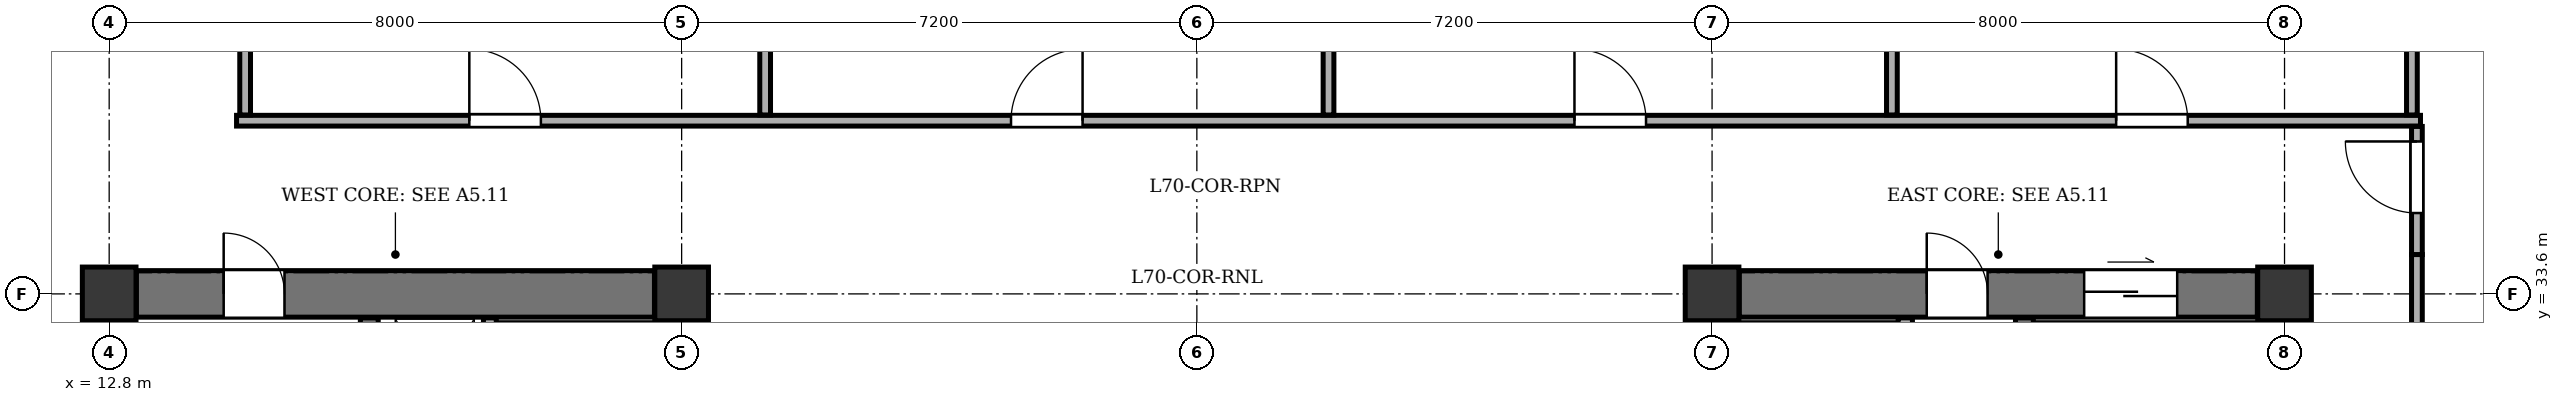
"""IFC4 building model, lengths in metres.
Left out: names, types, materials, properties, quantities, classifications, styles, units other than length and angle.
Written with IfcOpenShell. Run it as: python <this file> out.ifc"""

import sys

from ifc_helpers import new_model, si_unit, direction, frame, frame_2d, origin, origin_2d, place, context, subcontext, project, spatial, rectangle, extrude, element, fill, save


model = new_model("IFC4")
c1 = context("Model", 3, precision=1e-05, world=origin(), true_north=direction((0.0, 1.0)))
c2 = subcontext(c1, "Body", "Model", "MODEL_VIEW")
j1 = project(units=[si_unit("LENGTHUNIT", "METRE"), si_unit("PLANEANGLEUNIT", "RADIAN")], contexts=[c1])
p1 = place(None, origin())
s1 = spatial("IfcSite", under=j1, at=p1, CompositionType="ELEMENT")
p2 = place(p1, origin())
s2 = spatial("IfcBuilding", under=s1, at=p2, CompositionType="ELEMENT")
p3 = place(p2, frame((0.0, 0.0, 265.3)))
s3 = spatial("IfcBuildingStorey", under=s2, at=p3, CompositionType="ELEMENT", Elevation=265.3)
for number, where, z_axis, x_axis in (
    (1, (12.8, 33.6, 0.0), (0.0, 0.0, 1.0), (1.0, 0.0, 0.0)),
    (2, (20.8, 33.6, 0.0), (0.0, 0.0, 1.0), (1.0, 0.0, 0.0)),
    (3, (35.2, 33.6, 0.0), (0.0, 0.0, 1.0), (1.0, 0.0, 0.0)),
    (4, (43.2, 33.6, 0.0), (0.0, 0.0, 1.0), (1.0, 0.0, 0.0)),
):
    element("IfcColumn", number, at=place(p3, frame(where, z_axis=z_axis, x_axis=x_axis)), inside=s3, PredefinedType="COLUMN", context=c2, shape_type="SweptSolid", body=[
        extrude(rectangle(XDim=0.75, YDim=0.75, at=origin_2d()), origin(), (0.0, 0.0, 1.0), 3.4),
    ])
p4 = place(p3, frame((12.8, 21.18, 0.0), z_axis=(0.0, 0.0, 1.0), x_axis=(0.0, 1.0, 0.0)))
e5 = element("IfcWall", 5, at=p4, inside=s3, PredefinedType="SHEAR", context=c2, shape_type="SweptSolid", body=[
    extrude(rectangle(XDim=12.04, YDim=0.65, at=frame_2d((6.02, 0.0))), origin(), (0.0, 0.0, 1.0), 2.95),
])
p5 = place(p3, frame((13.18, 33.6, 0.0), z_axis=(0.0, 0.0, 1.0), x_axis=(1.0, 0.0, 0.0)))
e6 = element("IfcWall", 6, at=p5, inside=s3, PredefinedType="SHEAR", context=c2, shape_type="SweptSolid", body=[
    extrude(rectangle(XDim=7.24, YDim=0.65, at=frame_2d((3.62, 0.0))), origin(), (0.0, 0.0, 1.0), 2.95),
])
p6 = place(p5, frame((1.22, 0.0, 0.0)))
e7 = element("IfcOpeningElement", 7, at=p6, cuts=e6, PredefinedType="OPENING", context=c2, shape_type="SweptSolid", body=[
    extrude(rectangle(XDim=0.85, YDim=2.02, at=frame_2d((0.425, 1.01))), frame((0.0, 0.335, 0.0), z_axis=(0.0, -1.0, 0.0), x_axis=(1.0, 0.0, 0.0)), (0.0, 0.0, 1.0), 0.67),
])
p7 = place(p3, frame((20.8, 31.1, 0.0), z_axis=(0.0, 0.0, 1.0), x_axis=(0.0, 1.0, 0.0)))
e8 = element("IfcWall", 8, at=p7, inside=s3, PredefinedType="SHEAR", context=c2, shape_type="SweptSolid", body=[
    extrude(rectangle(XDim=2.12, YDim=0.65, at=frame_2d((1.06, 0.0))), origin(), (0.0, 0.0, 1.0), 2.95),
])
p8 = place(p7, frame((0.4, 0.0, 0.0)))
e9 = element("IfcOpeningElement", 9, at=p8, cuts=e8, PredefinedType="OPENING", context=c2, shape_type="SweptSolid", body=[
    extrude(rectangle(XDim=1.1, YDim=2.1, at=frame_2d((0.55, 1.05))), frame((0.0, 0.335, 0.0), z_axis=(0.0, -1.0, 0.0), x_axis=(1.0, 0.0, 0.0)), (0.0, 0.0, 1.0), 0.67),
])
p9 = place(p3, frame((16.435, 21.135, 0.0), z_axis=(0.0, 0.0, 1.0), x_axis=(0.0, 1.0, 0.0)))
e10 = element("IfcWall", 10, at=p9, inside=s3, PredefinedType="SHEAR", context=c2, shape_type="SweptSolid", body=[
    extrude(rectangle(XDim=12.13, YDim=0.25, at=frame_2d((6.065, 0.0))), origin(), (0.0, 0.0, 1.0), 2.95),
])
p10 = place(p9, frame((0.515, 0.0, 0.0)))
e11 = element("IfcOpeningElement", 11, at=p10, cuts=e10, PredefinedType="OPENING", context=c2, shape_type="SweptSolid", body=[
    extrude(rectangle(XDim=1.2, YDim=2.15, at=frame_2d((0.6, 1.075))), frame((0.0, 0.135, 0.0), z_axis=(0.0, -1.0, 0.0), x_axis=(1.0, 0.0, 0.0)), (0.0, 0.0, 1.0), 0.27),
])
p11 = place(p9, frame((2.665, 0.0, 0.0)))
e12 = element("IfcOpeningElement", 12, at=p11, cuts=e10, PredefinedType="OPENING", context=c2, shape_type="SweptSolid", body=[
    extrude(rectangle(XDim=1.15, YDim=2.15, at=frame_2d((0.575, 1.075))), frame((0.0, 0.135, 0.0), z_axis=(0.0, -1.0, 0.0), x_axis=(1.0, 0.0, 0.0)), (0.0, 0.0, 1.0), 0.27),
])
p12 = place(p3, frame((18.12, 31.17, 0.0), z_axis=(0.0, 0.0, 1.0), x_axis=(0.0, 1.0, 0.0)))
e13 = element("IfcWall", 13, at=p12, inside=s3, PredefinedType="PARTITIONING", context=c2, shape_type="SweptSolid", body=[
    extrude(rectangle(XDim=2.095, YDim=0.18, at=frame_2d((1.047, 0.0))), origin(), (0.0, 0.0, 1.0), 2.95),
])
p13 = place(p3, frame((43.2, 21.18, 0.0), z_axis=(0.0, 0.0, 1.0), x_axis=(0.0, 1.0, 0.0)))
e14 = element("IfcWall", 14, at=p13, inside=s3, PredefinedType="SHEAR", context=c2, shape_type="SweptSolid", body=[
    extrude(rectangle(XDim=12.04, YDim=0.65, at=frame_2d((6.02, 0.0))), origin(), (0.0, 0.0, 1.0), 2.95),
])
p14 = place(p3, frame((35.58, 33.6, 0.0), z_axis=(0.0, 0.0, 1.0), x_axis=(1.0, 0.0, 0.0)))
e15 = element("IfcWall", 15, at=p14, inside=s3, PredefinedType="SHEAR", context=c2, shape_type="SweptSolid", body=[
    extrude(rectangle(XDim=7.24, YDim=0.65, at=frame_2d((3.62, 0.0))), origin(), (0.0, 0.0, 1.0), 2.95),
])
p15 = place(p14, frame((4.82, 0.0, 0.0)))
e16 = element("IfcOpeningElement", 16, at=p15, cuts=e15, PredefinedType="OPENING", context=c2, shape_type="SweptSolid", body=[
    extrude(rectangle(XDim=1.3, YDim=2.15, at=frame_2d((0.65, 1.075))), frame((0.0, 0.335, 0.0), z_axis=(0.0, -1.0, 0.0), x_axis=(1.0, 0.0, 0.0)), (0.0, 0.0, 1.0), 0.67),
])
p16 = place(p14, frame((2.62, 0.0, 0.0)))
e17 = element("IfcOpeningElement", 17, at=p16, cuts=e15, PredefinedType="OPENING", context=c2, shape_type="SweptSolid", body=[
    extrude(rectangle(XDim=0.85, YDim=2.02, at=frame_2d((0.425, 1.01))), frame((0.0, 0.335, 0.0), z_axis=(0.0, -1.0, 0.0), x_axis=(1.0, 0.0, 0.0)), (0.0, 0.0, 1.0), 0.67),
])
p17 = place(p3, frame((35.2, 31.1, 0.0), z_axis=(0.0, 0.0, 1.0), x_axis=(0.0, 1.0, 0.0)))
e18 = element("IfcWall", 18, at=p17, inside=s3, PredefinedType="SHEAR", context=c2, shape_type="SweptSolid", body=[
    extrude(rectangle(XDim=2.12, YDim=0.65, at=frame_2d((1.06, 0.0))), origin(), (0.0, 0.0, 1.0), 2.95),
])
p18 = place(p17, frame((0.4, 0.0, 0.0)))
e19 = element("IfcOpeningElement", 19, at=p18, cuts=e18, PredefinedType="OPENING", context=c2, shape_type="SweptSolid", body=[
    extrude(rectangle(XDim=1.1, YDim=2.1, at=frame_2d((0.55, 1.05))), frame((0.0, 0.335, 0.0), z_axis=(0.0, -1.0, 0.0), x_axis=(1.0, 0.0, 0.0)), (0.0, 0.0, 1.0), 0.67),
])
p19 = place(p3, frame((39.565, 21.135, 0.0), z_axis=(0.0, 0.0, 1.0), x_axis=(0.0, 1.0, 0.0)))
e20 = element("IfcWall", 20, at=p19, inside=s3, PredefinedType="SHEAR", context=c2, shape_type="SweptSolid", body=[
    extrude(rectangle(XDim=12.13, YDim=0.25, at=frame_2d((6.065, 0.0))), origin(), (0.0, 0.0, 1.0), 2.95),
])
p20 = place(p19, frame((0.515, 0.0, 0.0)))
e21 = element("IfcOpeningElement", 21, at=p20, cuts=e20, PredefinedType="OPENING", context=c2, shape_type="SweptSolid", body=[
    extrude(rectangle(XDim=1.2, YDim=2.15, at=frame_2d((0.6, 1.075))), frame((0.0, 0.135, 0.0), z_axis=(0.0, -1.0, 0.0), x_axis=(1.0, 0.0, 0.0)), (0.0, 0.0, 1.0), 0.27),
])
p21 = place(p19, frame((2.665, 0.0, 0.0)))
e22 = element("IfcOpeningElement", 22, at=p21, cuts=e20, PredefinedType="OPENING", context=c2, shape_type="SweptSolid", body=[
    extrude(rectangle(XDim=1.15, YDim=2.15, at=frame_2d((0.575, 1.075))), frame((0.0, 0.135, 0.0), z_axis=(0.0, -1.0, 0.0), x_axis=(1.0, 0.0, 0.0)), (0.0, 0.0, 1.0), 0.27),
])
p22 = place(p3, frame((37.9, 25.27, 0.0), z_axis=(0.0, 0.0, 1.0), x_axis=(0.0, 1.0, 0.0)))
e23 = element("IfcWall", 23, at=p22, inside=s3, PredefinedType="SOLIDWALL", context=c2, shape_type="SweptSolid", body=[
    extrude(rectangle(XDim=7.995, YDim=0.2, at=frame_2d((3.998, 0.0))), origin(), (0.0, 0.0, 1.0), 2.95),
])
p23 = place(p3, frame((14.58, 36.02, 0.0), z_axis=(0.0, 0.0, 1.0), x_axis=(1.0, 0.0, 0.0)))
e24 = element("IfcWall", 24, at=p23, inside=s3, PredefinedType="PARTITIONING", context=c2, shape_type="SweptSolid", body=[
    extrude(rectangle(XDim=30.52, YDim=0.15, at=frame_2d((15.26, 0.0))), origin(), (0.0, 0.0, 1.0), 2.95),
])
p24 = place(p23, frame((3.253, 0.0, 0.0)))
e25 = element("IfcOpeningElement", 25, at=p24, cuts=e24, PredefinedType="OPENING", context=c2, shape_type="SweptSolid", body=[
    extrude(rectangle(XDim=1.0, YDim=2.1, at=frame_2d((0.5, 1.05))), frame((0.0, 0.085, 0.0), z_axis=(0.0, -1.0, 0.0), x_axis=(1.0, 0.0, 0.0)), (0.0, 0.0, 1.0), 0.17),
])
p25 = place(p23, frame((10.823, 0.0, 0.0)))
e26 = element("IfcOpeningElement", 26, at=p25, cuts=e24, PredefinedType="OPENING", context=c2, shape_type="SweptSolid", body=[
    extrude(rectangle(XDim=1.0, YDim=2.1, at=frame_2d((0.5, 1.05))), frame((0.0, 0.085, 0.0), z_axis=(0.0, -1.0, 0.0), x_axis=(1.0, 0.0, 0.0)), (0.0, 0.0, 1.0), 0.17),
])
p26 = place(p23, frame((18.697, 0.0, 0.0)))
e27 = element("IfcOpeningElement", 27, at=p26, cuts=e24, PredefinedType="OPENING", context=c2, shape_type="SweptSolid", body=[
    extrude(rectangle(XDim=1.0, YDim=2.1, at=frame_2d((0.5, 1.05))), frame((0.0, 0.085, 0.0), z_axis=(0.0, -1.0, 0.0), x_axis=(1.0, 0.0, 0.0)), (0.0, 0.0, 1.0), 0.17),
])
p27 = place(p23, frame((26.267, 0.0, 0.0)))
e28 = element("IfcOpeningElement", 28, at=p27, cuts=e24, PredefinedType="OPENING", context=c2, shape_type="SweptSolid", body=[
    extrude(rectangle(XDim=1.0, YDim=2.1, at=frame_2d((0.5, 1.05))), frame((0.0, 0.085, 0.0), z_axis=(0.0, -1.0, 0.0), x_axis=(1.0, 0.0, 0.0)), (0.0, 0.0, 1.0), 0.17),
])
for number, where, z_axis, x_axis in (
    (29, (14.7, 36.1, 0.0), (0.0, 0.0, 1.0), (0.0, 1.0, 0.0)),
    (30, (21.967, 36.1, 0.0), (0.0, 0.0, 1.0), (0.0, 1.0, 0.0)),
):
    element("IfcWall", number, at=place(p3, frame(where, z_axis=z_axis, x_axis=x_axis)), inside=s3, PredefinedType="PARTITIONING", context=c2, shape_type="SweptSolid", body=[
        extrude(rectangle(XDim=8.655, YDim=0.15, at=frame_2d((4.327, 0.0))), origin(), (0.0, 0.0, 1.0), 2.95),
    ])
p28 = place(p3, frame((29.84, 36.1, 0.0), z_axis=(0.0, 0.0, 1.0), x_axis=(0.0, 1.0, 0.0)))
e31 = element("IfcWall", 31, at=p28, inside=s3, PredefinedType="PARTITIONING", context=c2, shape_type="SweptSolid", body=[
    extrude(rectangle(XDim=8.655, YDim=0.15, at=frame_2d((4.327, 0.0))), origin(), (0.0, 0.0, 1.0), 2.385),
])
for number, where, z_axis, x_axis in (
    (32, (37.713, 36.1, 0.0), (0.0, 0.0, 1.0), (0.0, 1.0, 0.0)),
    (33, (44.98, 36.1, 0.0), (0.0, 0.0, 1.0), (0.0, 1.0, 0.0)),
):
    element("IfcWall", number, at=place(p3, frame(where, z_axis=z_axis, x_axis=x_axis)), inside=s3, PredefinedType="PARTITIONING", context=c2, shape_type="SweptSolid", body=[
        extrude(rectangle(XDim=8.655, YDim=0.15, at=frame_2d((4.327, 0.0))), origin(), (0.0, 0.0, 1.0), 2.95),
    ])
p29 = place(p3, frame((45.05, 20.25, 0.0), z_axis=(0.0, 0.0, 1.0), x_axis=(0.0, 1.0, 0.0)))
e34 = element("IfcWall", 34, at=p29, inside=s3, PredefinedType="PARTITIONING", context=c2, shape_type="SweptSolid", body=[
    extrude(rectangle(XDim=13.9, YDim=0.15, at=frame_2d((6.95, 0.0))), origin(), (0.0, 0.0, 1.0), 2.135),
])
p30 = place(p3, frame((45.05, 34.15, 0.0), z_axis=(0.0, 0.0, 1.0), x_axis=(0.0, 1.0, 0.0)))
e35 = element("IfcWall", 35, at=p30, inside=s3, PredefinedType="PARTITIONING", context=c2, shape_type="SweptSolid", body=[
    extrude(rectangle(XDim=1.79, YDim=0.15, at=frame_2d((0.895, 0.0))), origin(), (0.0, 0.0, 1.0), 2.135),
])
p31 = place(p30, frame((0.58, 0.0, 0.0)))
e36 = element("IfcOpeningElement", 36, at=p31, cuts=e35, PredefinedType="OPENING", context=c2, shape_type="SweptSolid", body=[
    extrude(rectangle(XDim=1.0, YDim=2.1, at=frame_2d((0.5, 1.05))), frame((0.0, 0.085, 0.0), z_axis=(0.0, -1.0, 0.0), x_axis=(1.0, 0.0, 0.0)), (0.0, 0.0, 1.0), 0.17),
])
p32 = place(p6, origin())
e37 = element("IfcDoor", 37, at=p32, inside=s3, OperationType="SINGLE_SWING_LEFT", PredefinedType="DOOR", context=c2, shape_type="SweptSolid", body=[
    extrude(rectangle(XDim=0.85, YDim=2.02, at=frame_2d((0.425, 1.01))), frame((0.0, 0.025, 0.0), z_axis=(0.0, -1.0, 0.0), x_axis=(1.0, 0.0, 0.0)), (0.0, 0.0, 1.0), 0.05),
])
fill(e7, e37)
p33 = place(p15, origin())
e38 = element("IfcDoor", 38, at=p33, inside=s3, OperationType="DOUBLE_DOOR_SLIDING", PredefinedType="DOOR", context=c2, shape_type="SweptSolid", body=[
    extrude(rectangle(XDim=1.3, YDim=2.15, at=frame_2d((0.65, 1.075))), frame((0.0, 0.025, 0.0), z_axis=(0.0, -1.0, 0.0), x_axis=(1.0, 0.0, 0.0)), (0.0, 0.0, 1.0), 0.05),
])
fill(e16, e38)
p34 = place(p16, origin())
e39 = element("IfcDoor", 39, at=p34, inside=s3, OperationType="SINGLE_SWING_LEFT", PredefinedType="DOOR", context=c2, shape_type="SweptSolid", body=[
    extrude(rectangle(XDim=0.85, YDim=2.02, at=frame_2d((0.425, 1.01))), frame((0.0, 0.025, 0.0), z_axis=(0.0, -1.0, 0.0), x_axis=(1.0, 0.0, 0.0)), (0.0, 0.0, 1.0), 0.05),
])
fill(e17, e39)
p35 = place(p24, origin())
e40 = element("IfcDoor", 40, at=p35, inside=s3, OperationType="SINGLE_SWING_LEFT", PredefinedType="DOOR", context=c2, shape_type="SweptSolid", body=[
    extrude(rectangle(XDim=1.0, YDim=2.1, at=frame_2d((0.5, 1.05))), frame((0.0, 0.025, 0.0), z_axis=(0.0, -1.0, 0.0), x_axis=(1.0, 0.0, 0.0)), (0.0, 0.0, 1.0), 0.05),
])
fill(e25, e40)
p36 = place(p25, origin())
e41 = element("IfcDoor", 41, at=p36, inside=s3, OperationType="SINGLE_SWING_RIGHT", PredefinedType="DOOR", context=c2, shape_type="SweptSolid", body=[
    extrude(rectangle(XDim=1.0, YDim=2.1, at=frame_2d((0.5, 1.05))), frame((0.0, 0.025, 0.0), z_axis=(0.0, -1.0, 0.0), x_axis=(1.0, 0.0, 0.0)), (0.0, 0.0, 1.0), 0.05),
])
fill(e26, e41)
p37 = place(p26, origin())
e42 = element("IfcDoor", 42, at=p37, inside=s3, OperationType="SINGLE_SWING_LEFT", PredefinedType="DOOR", context=c2, shape_type="SweptSolid", body=[
    extrude(rectangle(XDim=1.0, YDim=2.1, at=frame_2d((0.5, 1.05))), frame((0.0, 0.025, 0.0), z_axis=(0.0, -1.0, 0.0), x_axis=(1.0, 0.0, 0.0)), (0.0, 0.0, 1.0), 0.05),
])
fill(e27, e42)
p38 = place(p27, origin())
e43 = element("IfcDoor", 43, at=p38, inside=s3, OperationType="SINGLE_SWING_LEFT", PredefinedType="DOOR", context=c2, shape_type="SweptSolid", body=[
    extrude(rectangle(XDim=1.0, YDim=2.1, at=frame_2d((0.5, 1.05))), frame((0.0, 0.025, 0.0), z_axis=(0.0, -1.0, 0.0), x_axis=(1.0, 0.0, 0.0)), (0.0, 0.0, 1.0), 0.05),
])
fill(e28, e43)
p39 = place(p31, origin())
e44 = element("IfcDoor", 44, at=p39, inside=s3, OperationType="SINGLE_SWING_RIGHT", PredefinedType="DOOR", context=c2, shape_type="SweptSolid", body=[
    extrude(rectangle(XDim=1.0, YDim=2.1, at=frame_2d((0.5, 1.05))), frame((0.0, 0.025, 0.0), z_axis=(0.0, -1.0, 0.0), x_axis=(1.0, 0.0, 0.0)), (0.0, 0.0, 1.0), 0.05),
])
fill(e36, e44)
save(model, sys.argv[1])
